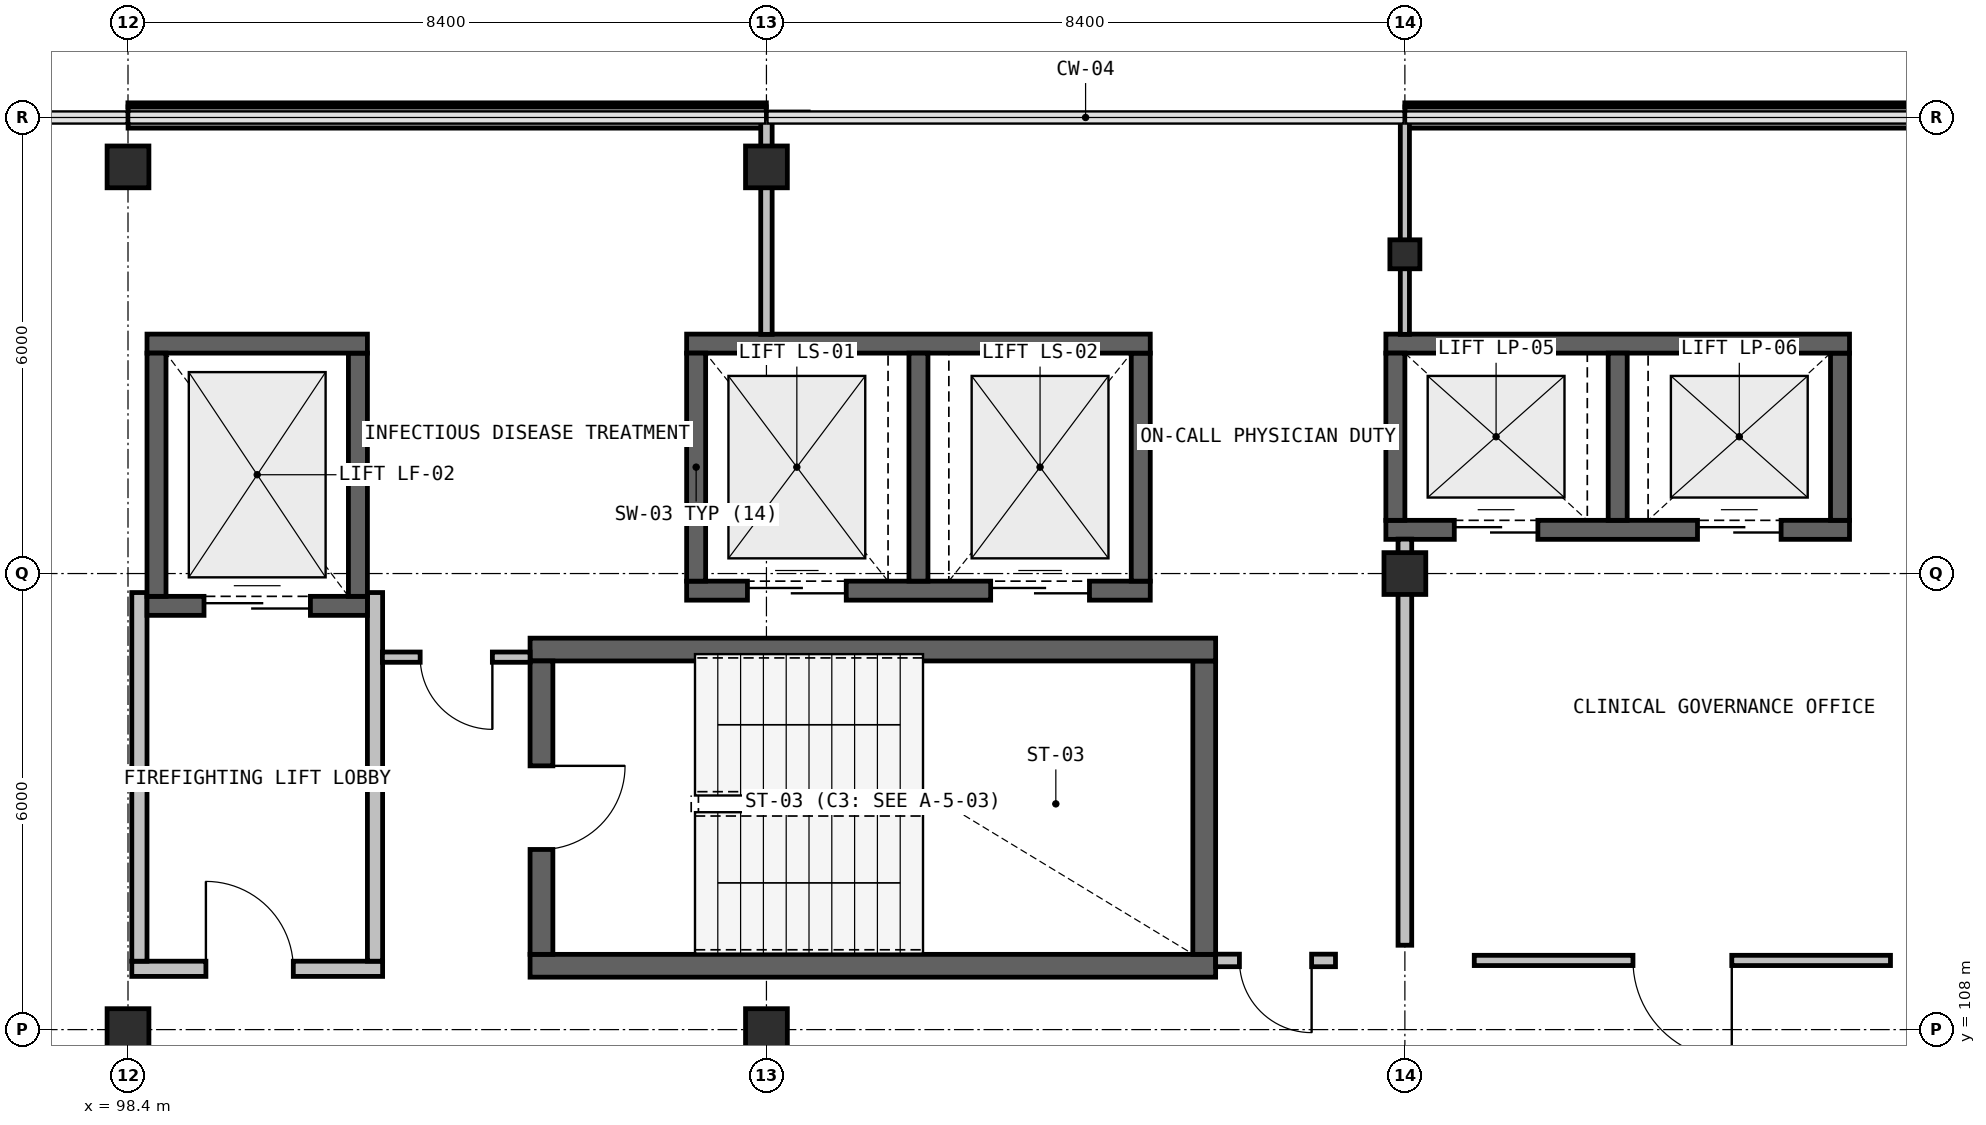
"""IFC4 building model, lengths in metres.
Left out: names, types, materials, properties, quantities, classifications, styles, units other than length and angle.
Written with IfcOpenShell. Run it as: python <this file> out.ifc"""

import sys

from ifc_helpers import new_model, si_unit, direction, frame, frame_2d, origin, origin_2d, place, context, subcontext, project, spatial, rectangle, i_section, extrude, element, fill, save


model = new_model("IFC4")
c1 = context("Model", 3, precision=1e-05, world=origin(), true_north=direction((0.0, 1.0)))
c2 = subcontext(c1, "Body", "Model", "MODEL_VIEW")
j1 = project(units=[si_unit("LENGTHUNIT", "METRE"), si_unit("PLANEANGLEUNIT", "RADIAN")], contexts=[c1])
p1 = place(None, origin())
s1 = spatial("IfcSite", under=j1, at=p1, CompositionType="ELEMENT")
p2 = place(p1, origin())
s2 = spatial("IfcBuilding", under=s1, at=p2, CompositionType="ELEMENT")
p3 = place(p2, frame((0.0, 0.0, 35.4)))
s3 = spatial("IfcBuildingStorey", under=s2, at=p3, CompositionType="ELEMENT", Elevation=35.4)
p4 = place(p3, frame((115.2, 118.2, 0.0), z_axis=(0.0, 0.0, 1.0), x_axis=(1.0, 0.0, 0.0)))
e1 = element("IfcColumn", 1, at=p4, inside=s3, PredefinedType="COLUMN", context=c2, shape_type="SweptSolid", body=[
    extrude(i_section(OverallWidth=0.395, OverallDepth=0.381, WebThickness=0.018, FlangeThickness=0.03, at=origin_2d()), origin(), (0.0, 0.0, 1.0), 4.05),
])
for number, where, z_axis, x_axis in (
    (2, (98.4, 108.0, 0.0), (0.0, 0.0, 1.0), (1.0, 0.0, 0.0)),
    (3, (98.4, 119.35, 0.0), (0.0, 0.0, 1.0), (1.0, 0.0, 0.0)),
    (4, (106.8, 108.0, 0.0), (0.0, 0.0, 1.0), (1.0, 0.0, 0.0)),
    (5, (106.8, 119.35, 0.0), (0.0, 0.0, 1.0), (1.0, 0.0, 0.0)),
    (6, (115.2, 114.0, 0.0), (0.0, 0.0, 1.0), (1.0, 0.0, 0.0)),
):
    element("IfcColumn", number, at=place(p3, frame(where, z_axis=z_axis, x_axis=x_axis)), inside=s3, PredefinedType="COLUMN", context=c2, shape_type="SweptSolid", body=[
        extrude(rectangle(XDim=0.55, YDim=0.55, at=origin_2d()), origin(), (0.0, 0.0, 1.0), 3.74),
    ])
p5 = place(p3, frame((98.401, 120.0, 0.0), z_axis=(0.0, 0.0, 1.0), x_axis=(1.0, 0.0, 0.0)))
e7 = element("IfcWall", 7, at=p5, inside=s3, PredefinedType="SOLIDWALL", context=c2, shape_type="SweptSolid", body=[
    extrude(rectangle(XDim=8.396, YDim=0.28, at=frame_2d((4.198, 0.0))), origin(), (0.0, 0.0, 1.0), 0.94),
])
p6 = place(p3, frame((115.201, 120.0, 0.0), z_axis=(0.0, 0.0, 1.0), x_axis=(1.0, 0.0, 0.0)))
e8 = element("IfcWall", 8, at=p6, inside=s3, PredefinedType="SOLIDWALL", context=c2, shape_type="SweptSolid", body=[
    extrude(rectangle(XDim=8.396, YDim=0.28, at=frame_2d((4.198, 0.0))), origin(), (0.0, 0.0, 1.0), 0.94),
])
p7 = place(p3, frame((98.45, 108.8, 0.0), z_axis=(0.0, 0.0, 1.0), x_axis=(1.0, 0.0, 0.0)))
e9 = element("IfcWall", 9, at=p7, inside=s3, PredefinedType="SOLIDWALL", context=c2, shape_type="SweptSolid", body=[
    extrude(rectangle(XDim=3.3, YDim=0.2, at=frame_2d((1.65, 0.0))), origin(), (0.0, 0.0, 1.0), 3.74),
])
p8 = place(p7, frame((0.975, 0.0, 0.0)))
e10 = element("IfcOpeningElement", 10, at=p8, cuts=e9, PredefinedType="OPENING", context=c2, shape_type="SweptSolid", body=[
    extrude(rectangle(XDim=1.15, YDim=2.15, at=frame_2d((0.575, 1.075))), frame((0.0, 0.11, 0.0), z_axis=(0.0, -1.0, 0.0), x_axis=(1.0, 0.0, 0.0)), (0.0, 0.0, 1.0), 0.22),
])
p9 = place(p3, frame((101.65, 108.9, 0.0), z_axis=(0.0, 0.0, 1.0), x_axis=(0.0, 1.0, 0.0)))
e11 = element("IfcWall", 11, at=p9, inside=s3, PredefinedType="SOLIDWALL", context=c2, shape_type="SweptSolid", body=[
    extrude(rectangle(XDim=4.85, YDim=0.2, at=frame_2d((2.425, 0.0))), origin(), (0.0, 0.0, 1.0), 3.74),
])
p10 = place(p3, frame((98.55, 113.75, 0.0), z_axis=(0.0, 0.0, 1.0), x_axis=(0.0, -1.0, 0.0)))
e12 = element("IfcWall", 12, at=p10, inside=s3, PredefinedType="SOLIDWALL", context=c2, shape_type="SweptSolid", body=[
    extrude(rectangle(XDim=4.85, YDim=0.2, at=frame_2d((2.425, 0.0))), origin(), (0.0, 0.0, 1.0), 3.14),
])
p11 = place(p3, frame((103.69, 108.84, 0.0), z_axis=(0.0, 0.0, 1.0), x_axis=(1.0, 0.0, 0.0)))
e13 = element("IfcWall", 13, at=p11, inside=s3, PredefinedType="SHEAR", context=c2, shape_type="SweptSolid", body=[
    extrude(rectangle(XDim=9.02, YDim=0.3, at=frame_2d((4.51, 0.0))), origin(), (0.0, 0.0, 1.0), 3.74),
])
p12 = place(p3, frame((112.56, 108.99, 0.0), z_axis=(0.0, 0.0, 1.0), x_axis=(0.0, 1.0, 0.0)))
e14 = element("IfcWall", 14, at=p12, inside=s3, PredefinedType="SHEAR", context=c2, shape_type="SweptSolid", body=[
    extrude(rectangle(XDim=3.86, YDim=0.3, at=frame_2d((1.93, 0.0))), origin(), (0.0, 0.0, 1.0), 3.74),
])
p13 = place(p3, frame((112.71, 113.0, 0.0), z_axis=(0.0, 0.0, 1.0), x_axis=(-1.0, 0.0, 0.0)))
e15 = element("IfcWall", 15, at=p13, inside=s3, PredefinedType="SHEAR", context=c2, shape_type="SweptSolid", body=[
    extrude(rectangle(XDim=9.02, YDim=0.3, at=frame_2d((4.51, 0.0))), origin(), (0.0, 0.0, 1.0), 3.74),
])
p14 = place(p3, frame((103.84, 112.85, 0.0), z_axis=(0.0, 0.0, 1.0), x_axis=(0.0, -1.0, 0.0)))
e16 = element("IfcWall", 16, at=p14, inside=s3, PredefinedType="SHEAR", context=c2, shape_type="SweptSolid", body=[
    extrude(rectangle(XDim=3.86, YDim=0.3, at=frame_2d((1.93, 0.0))), origin(), (0.0, 0.0, 1.0), 3.74),
])
p15 = place(p14, frame((1.38, 0.0, 0.0)))
e17 = element("IfcOpeningElement", 17, at=p15, cuts=e16, PredefinedType="OPENING", context=c2, shape_type="SweptSolid", body=[
    extrude(rectangle(XDim=1.1, YDim=2.15, at=frame_2d((0.55, 1.075))), frame((0.0, 0.16, 0.0), z_axis=(0.0, -1.0, 0.0), x_axis=(1.0, 0.0, 0.0)), (0.0, 0.0, 1.0), 0.32),
])
p16 = place(p3, frame((98.65, 113.575, 0.0), z_axis=(0.0, 0.0, 1.0), x_axis=(1.0, 0.0, 0.0)))
e18 = element("IfcWall", 18, at=p16, inside=s3, PredefinedType="SHEAR", context=c2, shape_type="SweptSolid", body=[
    extrude(rectangle(XDim=2.9, YDim=0.25, at=frame_2d((1.45, 0.0))), origin(), (0.0, 0.0, 1.0), 3.74),
])
p17 = place(p16, frame((0.75, 0.0, 0.0)))
e19 = element("IfcOpeningElement", 19, at=p17, cuts=e18, PredefinedType="OPENING", context=c2, shape_type="SweptSolid", body=[
    extrude(rectangle(XDim=1.4, YDim=2.15, at=frame_2d((0.7, 1.075))), frame((0.0, 0.135, 0.0), z_axis=(0.0, -1.0, 0.0), x_axis=(1.0, 0.0, 0.0)), (0.0, 0.0, 1.0), 0.27),
])
p18 = place(p3, frame((101.425, 113.7, 0.0), z_axis=(0.0, 0.0, 1.0), x_axis=(0.0, 1.0, 0.0)))
e20 = element("IfcWall", 20, at=p18, inside=s3, PredefinedType="SHEAR", context=c2, shape_type="SweptSolid", body=[
    extrude(rectangle(XDim=3.2, YDim=0.25, at=frame_2d((1.6, 0.0))), origin(), (0.0, 0.0, 1.0), 3.74),
])
p19 = place(p3, frame((101.55, 117.025, 0.0), z_axis=(0.0, 0.0, 1.0), x_axis=(-1.0, 0.0, 0.0)))
e21 = element("IfcWall", 21, at=p19, inside=s3, PredefinedType="SHEAR", context=c2, shape_type="SweptSolid", body=[
    extrude(rectangle(XDim=2.9, YDim=0.25, at=frame_2d((1.45, 0.0))), origin(), (0.0, 0.0, 1.0), 3.74),
])
p20 = place(p3, frame((98.775, 116.9, 0.0), z_axis=(0.0, 0.0, 1.0), x_axis=(0.0, -1.0, 0.0)))
e22 = element("IfcWall", 22, at=p20, inside=s3, PredefinedType="SHEAR", context=c2, shape_type="SweptSolid", body=[
    extrude(rectangle(XDim=3.2, YDim=0.25, at=frame_2d((1.6, 0.0))), origin(), (0.0, 0.0, 1.0), 3.74),
])
p21 = place(p3, frame((105.75, 113.775, 0.0), z_axis=(0.0, 0.0, 1.0), x_axis=(1.0, 0.0, 0.0)))
e23 = element("IfcWall", 23, at=p21, inside=s3, PredefinedType="SHEAR", context=c2, shape_type="SweptSolid", body=[
    extrude(rectangle(XDim=6.1, YDim=0.25, at=frame_2d((3.05, 0.0))), origin(), (0.0, 0.0, 1.0), 3.74),
])
p22 = place(p21, frame((0.8, 0.0, 0.0)))
e24 = element("IfcOpeningElement", 24, at=p22, cuts=e23, PredefinedType="OPENING", context=c2, shape_type="SweptSolid", body=[
    extrude(rectangle(XDim=1.3, YDim=2.15, at=frame_2d((0.65, 1.075))), frame((0.0, 0.135, 0.0), z_axis=(0.0, -1.0, 0.0), x_axis=(1.0, 0.0, 0.0)), (0.0, 0.0, 1.0), 0.27),
])
p23 = place(p21, frame((4.0, 0.0, 0.0)))
e25 = element("IfcOpeningElement", 25, at=p23, cuts=e23, PredefinedType="OPENING", context=c2, shape_type="SweptSolid", body=[
    extrude(rectangle(XDim=1.3, YDim=2.15, at=frame_2d((0.65, 1.075))), frame((0.0, 0.135, 0.0), z_axis=(0.0, -1.0, 0.0), x_axis=(1.0, 0.0, 0.0)), (0.0, 0.0, 1.0), 0.27),
])
p24 = place(p3, frame((111.725, 113.9, 0.0), z_axis=(0.0, 0.0, 1.0), x_axis=(0.0, 1.0, 0.0)))
e26 = element("IfcWall", 26, at=p24, inside=s3, PredefinedType="SHEAR", context=c2, shape_type="SweptSolid", body=[
    extrude(rectangle(XDim=3.0, YDim=0.25, at=frame_2d((1.5, 0.0))), origin(), (0.0, 0.0, 1.0), 3.74),
])
p25 = place(p3, frame((111.85, 117.025, 0.0), z_axis=(0.0, 0.0, 1.0), x_axis=(-1.0, 0.0, 0.0)))
e27 = element("IfcWall", 27, at=p25, inside=s3, PredefinedType="SHEAR", context=c2, shape_type="SweptSolid", body=[
    extrude(rectangle(XDim=6.1, YDim=0.25, at=frame_2d((3.05, 0.0))), origin(), (0.0, 0.0, 1.0), 3.74),
])
for number, where, z_axis, x_axis in (
    (28, (105.875, 116.9, 0.0), (0.0, 0.0, 1.0), (0.0, -1.0, 0.0)),
    (29, (108.8, 113.9, 0.0), (0.0, 0.0, 1.0), (0.0, 1.0, 0.0)),
):
    element("IfcWall", number, at=place(p3, frame(where, z_axis=z_axis, x_axis=x_axis)), inside=s3, PredefinedType="SHEAR", context=c2, shape_type="SweptSolid", body=[
        extrude(rectangle(XDim=3.0, YDim=0.25, at=frame_2d((1.5, 0.0))), origin(), (0.0, 0.0, 1.0), 3.74),
    ])
p26 = place(p3, frame((114.95, 114.575, 0.0), z_axis=(0.0, 0.0, 1.0), x_axis=(1.0, 0.0, 0.0)))
e30 = element("IfcWall", 30, at=p26, inside=s3, PredefinedType="SHEAR", context=c2, shape_type="SweptSolid", body=[
    extrude(rectangle(XDim=6.1, YDim=0.25, at=frame_2d((3.05, 0.0))), origin(), (0.0, 0.0, 1.0), 3.74),
])
p27 = place(p26, frame((0.9, 0.0, 0.0)))
e31 = element("IfcOpeningElement", 31, at=p27, cuts=e30, PredefinedType="OPENING", context=c2, shape_type="SweptSolid", body=[
    extrude(rectangle(XDim=1.1, YDim=2.15, at=frame_2d((0.55, 1.075))), frame((0.0, 0.135, 0.0), z_axis=(0.0, -1.0, 0.0), x_axis=(1.0, 0.0, 0.0)), (0.0, 0.0, 1.0), 0.27),
])
p28 = place(p26, frame((4.1, 0.0, 0.0)))
e32 = element("IfcOpeningElement", 32, at=p28, cuts=e30, PredefinedType="OPENING", context=c2, shape_type="SweptSolid", body=[
    extrude(rectangle(XDim=1.1, YDim=2.15, at=frame_2d((0.55, 1.075))), frame((0.0, 0.135, 0.0), z_axis=(0.0, -1.0, 0.0), x_axis=(1.0, 0.0, 0.0)), (0.0, 0.0, 1.0), 0.27),
])
p29 = place(p3, frame((120.925, 114.7, 0.0), z_axis=(0.0, 0.0, 1.0), x_axis=(0.0, 1.0, 0.0)))
e33 = element("IfcWall", 33, at=p29, inside=s3, PredefinedType="SHEAR", context=c2, shape_type="SweptSolid", body=[
    extrude(rectangle(XDim=2.2, YDim=0.25, at=frame_2d((1.1, 0.0))), origin(), (0.0, 0.0, 1.0), 3.74),
])
p30 = place(p3, frame((121.05, 117.025, 0.0), z_axis=(0.0, 0.0, 1.0), x_axis=(-1.0, 0.0, 0.0)))
e34 = element("IfcWall", 34, at=p30, inside=s3, PredefinedType="SHEAR", context=c2, shape_type="SweptSolid", body=[
    extrude(rectangle(XDim=6.1, YDim=0.25, at=frame_2d((3.05, 0.0))), origin(), (0.0, 0.0, 1.0), 3.74),
])
for number, where, z_axis, x_axis in (
    (35, (115.075, 116.9, 0.0), (0.0, 0.0, 1.0), (0.0, -1.0, 0.0)),
    (36, (118.0, 114.7, 0.0), (0.0, 0.0, 1.0), (0.0, 1.0, 0.0)),
):
    element("IfcWall", number, at=place(p3, frame(where, z_axis=z_axis, x_axis=x_axis)), inside=s3, PredefinedType="SHEAR", context=c2, shape_type="SweptSolid", body=[
        extrude(rectangle(XDim=2.2, YDim=0.25, at=frame_2d((1.1, 0.0))), origin(), (0.0, 0.0, 1.0), 3.74),
    ])
p31 = place(p3, frame((106.8, 119.99, 0.0), z_axis=(0.0, 0.0, 1.0), x_axis=(0.0, -1.0, 0.0)))
e37 = element("IfcWall", 37, at=p31, inside=s3, PredefinedType="PARTITIONING", context=c2, shape_type="SweptSolid", body=[
    extrude(rectangle(XDim=2.843, YDim=0.15, at=frame_2d((1.421, 0.0))), origin(), (0.0, 0.0, 1.0), 3.74),
])
p32 = place(p3, frame((103.69, 112.9, 0.0), z_axis=(0.0, 0.0, 1.0), x_axis=(-1.0, 0.0, 0.0)))
e38 = element("IfcWall", 38, at=p32, inside=s3, PredefinedType="PARTITIONING", context=c2, shape_type="SweptSolid", body=[
    extrude(rectangle(XDim=1.943, YDim=0.135, at=frame_2d((0.971, 0.0))), origin(), (0.0, 0.0, 1.0), 3.74),
])
p33 = place(p32, frame((0.496, 0.0, 0.0)))
e39 = element("IfcOpeningElement", 39, at=p33, cuts=e38, PredefinedType="OPENING", context=c2, shape_type="SweptSolid", body=[
    extrude(rectangle(XDim=0.95, YDim=2.1, at=frame_2d((0.475, 1.05))), frame((0.0, 0.077, 0.0), z_axis=(0.0, -1.0, 0.0), x_axis=(1.0, 0.0, 0.0)), (0.0, 0.0, 1.0), 0.155),
])
p34 = place(p3, frame((115.2, 119.99, 0.0), z_axis=(0.0, 0.0, 1.0), x_axis=(0.0, -1.0, 0.0)))
e40 = element("IfcWall", 40, at=p34, inside=s3, PredefinedType="PARTITIONING", context=c2, shape_type="SweptSolid", body=[
    extrude(rectangle(XDim=2.843, YDim=0.12, at=frame_2d((1.421, 0.0))), origin(), (0.0, 0.0, 1.0), 3.74),
])
p35 = place(p3, frame((115.2, 114.453, 0.0), z_axis=(0.0, 0.0, 1.0), x_axis=(0.0, -1.0, 0.0)))
e41 = element("IfcWall", 41, at=p35, inside=s3, PredefinedType="PARTITIONING", context=c2, shape_type="SweptSolid", body=[
    extrude(rectangle(XDim=5.343, YDim=0.18, at=frame_2d((2.671, 0.0))), origin(), (0.0, 0.0, 1.0), 3.14),
])
p36 = place(p3, frame((114.287, 108.91, 0.0), z_axis=(0.0, 0.0, 1.0), x_axis=(-1.0, 0.0, 0.0)))
e42 = element("IfcWall", 42, at=p36, inside=s3, PredefinedType="PARTITIONING", context=c2, shape_type="SweptSolid", body=[
    extrude(rectangle(XDim=1.577, YDim=0.165, at=frame_2d((0.789, 0.0))), origin(), (0.0, 0.0, 1.0), 3.74),
])
p37 = place(p36, frame((0.314, 0.0, 0.0)))
e43 = element("IfcOpeningElement", 43, at=p37, cuts=e42, PredefinedType="OPENING", context=c2, shape_type="SweptSolid", body=[
    extrude(rectangle(XDim=0.95, YDim=2.1, at=frame_2d((0.475, 1.05))), frame((0.0, 0.093, 0.0), z_axis=(0.0, -1.0, 0.0), x_axis=(1.0, 0.0, 0.0)), (0.0, 0.0, 1.0), 0.185),
])
p38 = place(p3, frame((121.589, 108.91, 0.0), z_axis=(0.0, 0.0, 1.0), x_axis=(-1.0, 0.0, 0.0)))
e44 = element("IfcWall", 44, at=p38, inside=s3, PredefinedType="PARTITIONING", context=c2, shape_type="SweptSolid", body=[
    extrude(rectangle(XDim=5.476, YDim=0.135, at=frame_2d((2.738, 0.0))), origin(), (0.0, 0.0, 1.0), 3.74),
])
p39 = place(p38, frame((2.088, 0.0, 0.0)))
e45 = element("IfcOpeningElement", 45, at=p39, cuts=e44, PredefinedType="OPENING", context=c2, shape_type="SweptSolid", body=[
    extrude(rectangle(XDim=1.3, YDim=2.15, at=frame_2d((0.65, 1.075))), frame((0.0, 0.077, 0.0), z_axis=(0.0, -1.0, 0.0), x_axis=(1.0, 0.0, 0.0)), (0.0, 0.0, 1.0), 0.155),
])
p40 = place(p8, origin())
e46 = element("IfcDoor", 46, at=p40, inside=s3, OperationType="SINGLE_SWING_RIGHT", PredefinedType="DOOR", context=c2, shape_type="SweptSolid", body=[
    extrude(rectangle(XDim=1.15, YDim=2.15, at=frame_2d((0.575, 1.075))), frame((0.0, 0.025, 0.0), z_axis=(0.0, -1.0, 0.0), x_axis=(1.0, 0.0, 0.0)), (0.0, 0.0, 1.0), 0.05),
])
fill(e10, e46)
p41 = place(p15, origin())
e47 = element("IfcDoor", 47, at=p41, inside=s3, OperationType="SINGLE_SWING_RIGHT", PredefinedType="DOOR", context=c2, shape_type="SweptSolid", body=[
    extrude(rectangle(XDim=1.1, YDim=2.15, at=frame_2d((0.55, 1.075))), frame((0.0, 0.025, 0.0), z_axis=(0.0, -1.0, 0.0), x_axis=(1.0, 0.0, 0.0)), (0.0, 0.0, 1.0), 0.05),
])
fill(e17, e47)
p42 = place(p17, origin())
e48 = element("IfcDoor", 48, at=p42, inside=s3, OperationType="DOUBLE_DOOR_SLIDING", PredefinedType="DOOR", context=c2, shape_type="SweptSolid", body=[
    extrude(rectangle(XDim=1.4, YDim=2.15, at=frame_2d((0.7, 1.075))), frame((0.0, 0.025, 0.0), z_axis=(0.0, -1.0, 0.0), x_axis=(1.0, 0.0, 0.0)), (0.0, 0.0, 1.0), 0.05),
])
fill(e19, e48)
p43 = place(p22, origin())
e49 = element("IfcDoor", 49, at=p43, inside=s3, OperationType="DOUBLE_DOOR_SLIDING", PredefinedType="DOOR", context=c2, shape_type="SweptSolid", body=[
    extrude(rectangle(XDim=1.3, YDim=2.15, at=frame_2d((0.65, 1.075))), frame((0.0, 0.025, 0.0), z_axis=(0.0, -1.0, 0.0), x_axis=(1.0, 0.0, 0.0)), (0.0, 0.0, 1.0), 0.05),
])
fill(e24, e49)
p44 = place(p23, origin())
e50 = element("IfcDoor", 50, at=p44, inside=s3, OperationType="DOUBLE_DOOR_SLIDING", PredefinedType="DOOR", context=c2, shape_type="SweptSolid", body=[
    extrude(rectangle(XDim=1.3, YDim=2.15, at=frame_2d((0.65, 1.075))), frame((0.0, 0.025, 0.0), z_axis=(0.0, -1.0, 0.0), x_axis=(1.0, 0.0, 0.0)), (0.0, 0.0, 1.0), 0.05),
])
fill(e25, e50)
p45 = place(p27, origin())
e51 = element("IfcDoor", 51, at=p45, inside=s3, OperationType="DOUBLE_DOOR_SLIDING", PredefinedType="DOOR", context=c2, shape_type="SweptSolid", body=[
    extrude(rectangle(XDim=1.1, YDim=2.15, at=frame_2d((0.55, 1.075))), frame((0.0, 0.025, 0.0), z_axis=(0.0, -1.0, 0.0), x_axis=(1.0, 0.0, 0.0)), (0.0, 0.0, 1.0), 0.05),
])
fill(e31, e51)
p46 = place(p28, origin())
e52 = element("IfcDoor", 52, at=p46, inside=s3, OperationType="DOUBLE_DOOR_SLIDING", PredefinedType="DOOR", context=c2, shape_type="SweptSolid", body=[
    extrude(rectangle(XDim=1.1, YDim=2.15, at=frame_2d((0.55, 1.075))), frame((0.0, 0.025, 0.0), z_axis=(0.0, -1.0, 0.0), x_axis=(1.0, 0.0, 0.0)), (0.0, 0.0, 1.0), 0.05),
])
fill(e32, e52)
p47 = place(p33, origin())
e53 = element("IfcDoor", 53, at=p47, inside=s3, OperationType="SINGLE_SWING_LEFT", PredefinedType="DOOR", context=c2, shape_type="SweptSolid", body=[
    extrude(rectangle(XDim=0.95, YDim=2.1, at=frame_2d((0.475, 1.05))), frame((0.0, 0.025, 0.0), z_axis=(0.0, -1.0, 0.0), x_axis=(1.0, 0.0, 0.0)), (0.0, 0.0, 1.0), 0.05),
])
fill(e39, e53)
p48 = place(p37, origin())
e54 = element("IfcDoor", 54, at=p48, inside=s3, OperationType="SINGLE_SWING_RIGHT", PredefinedType="DOOR", context=c2, shape_type="SweptSolid", body=[
    extrude(rectangle(XDim=0.95, YDim=2.1, at=frame_2d((0.475, 1.05))), frame((0.0, 0.025, 0.0), z_axis=(0.0, -1.0, 0.0), x_axis=(1.0, 0.0, 0.0)), (0.0, 0.0, 1.0), 0.05),
])
fill(e43, e54)
p49 = place(p39, origin())
e55 = element("IfcDoor", 55, at=p49, inside=s3, OperationType="SINGLE_SWING_LEFT", PredefinedType="DOOR", context=c2, shape_type="SweptSolid", body=[
    extrude(rectangle(XDim=1.3, YDim=2.15, at=frame_2d((0.65, 1.075))), frame((0.0, 0.025, 0.0), z_axis=(0.0, -1.0, 0.0), x_axis=(1.0, 0.0, 0.0)), (0.0, 0.0, 1.0), 0.05),
])
fill(e45, e55)
save(model, sys.argv[1])
